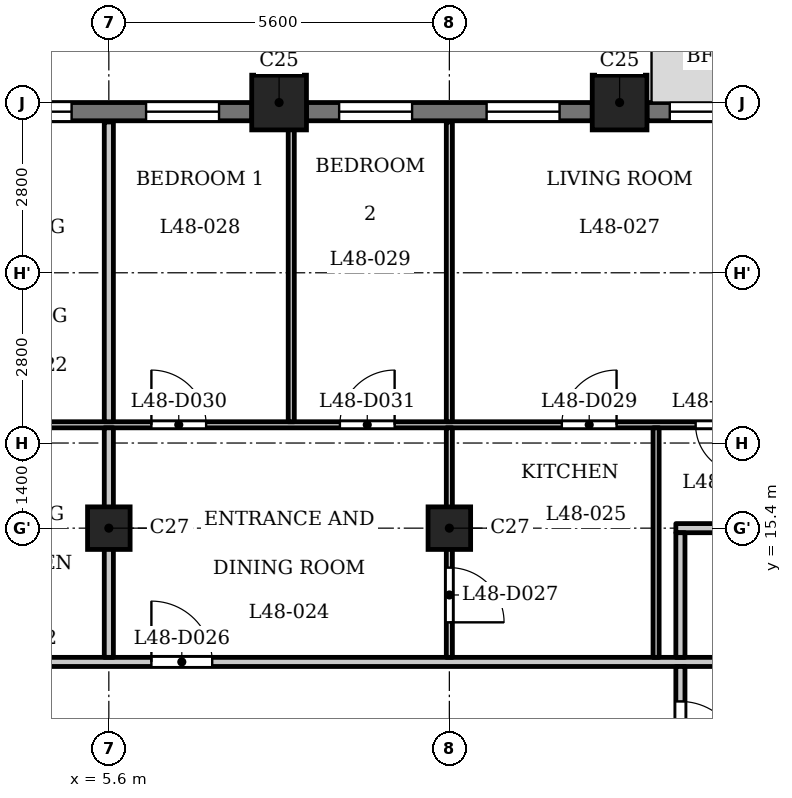
"""IFC4 building model, lengths in metres.
Left out: names, types, materials, properties, quantities, classifications, styles, units other than length and angle.
Written with IfcOpenShell. Run it as: python <this file> out.ifc"""

import sys

from ifc_helpers import new_model, si_unit, direction, frame, frame_2d, origin, origin_2d, place, context, subcontext, project, spatial, rectangle, extrude, element, fill, save


model = new_model("IFC4")
c1 = context("Model", 3, precision=1e-05, world=origin(), true_north=direction((0.0, 1.0)))
c2 = subcontext(c1, "Body", "Model", "MODEL_VIEW")
j1 = project(units=[si_unit("LENGTHUNIT", "METRE"), si_unit("PLANEANGLEUNIT", "RADIAN")], contexts=[c1])
p1 = place(None, origin())
s1 = spatial("IfcSite", under=j1, at=p1, CompositionType="ELEMENT")
p2 = place(p1, origin())
s2 = spatial("IfcBuilding", under=s1, at=p2, CompositionType="ELEMENT")
p3 = place(p2, frame((0.0, 0.0, 188.9)))
s3 = spatial("IfcBuildingStorey", under=s2, at=p3, CompositionType="ELEMENT", Elevation=188.9)
for number, where, z_axis, x_axis in (
    (1, (14.0, 22.4, 0.0), (0.0, 0.0, 1.0), (1.0, 0.0, 0.0)),
    (2, (8.4, 22.4, 0.0), (0.0, 0.0, 1.0), (1.0, 0.0, 0.0)),
):
    element("IfcColumn", number, at=place(p3, frame(where, z_axis=z_axis, x_axis=x_axis)), inside=s3, PredefinedType="COLUMN", context=c2, shape_type="SweptSolid", body=[
        extrude(rectangle(XDim=0.9, YDim=0.9, at=origin_2d()), origin(), (0.0, 0.0, 1.0), 3.5),
    ])
for number, where, z_axis, x_axis in (
    (3, (5.6, 15.4, 0.0), (0.0, 0.0, 1.0), (1.0, 0.0, 0.0)),
    (4, (11.2, 15.4, 0.0), (0.0, 0.0, 1.0), (1.0, 0.0, 0.0)),
):
    element("IfcColumn", number, at=place(p3, frame(where, z_axis=z_axis, x_axis=x_axis)), inside=s3, PredefinedType="COLUMN", context=c2, shape_type="SweptSolid", body=[
        extrude(rectangle(XDim=0.7, YDim=0.7, at=origin_2d()), origin(), (0.0, 0.0, 1.0), 3.5),
    ])
p4 = place(p3, frame((16.4, 22.25, 0.0), z_axis=(0.0, 0.0, 1.0), x_axis=(-1.0, 0.0, 0.0)))
e5 = element("IfcWall", 5, at=p4, inside=s3, PredefinedType="SOLIDWALL", context=c2, shape_type="SweptSolid", body=[
    extrude(rectangle(XDim=1.95, YDim=0.3, at=frame_2d((0.975, 0.0))), origin(), (0.0, 0.0, 1.0), 2.5),
])
p5 = place(p4, frame((0.375, 0.0, 0.6)))
e6 = element("IfcOpeningElement", 6, at=p5, cuts=e5, PredefinedType="OPENING", context=c2, shape_type="SweptSolid", body=[
    extrude(rectangle(XDim=1.2, YDim=1.55, at=frame_2d((0.6, 0.775))), frame((0.0, 0.16, 0.0), z_axis=(0.0, -1.0, 0.0), x_axis=(1.0, 0.0, 0.0)), (0.0, 0.0, 1.0), 0.32),
])
p6 = place(p3, frame((13.55, 22.25, 0.0), z_axis=(0.0, 0.0, 1.0), x_axis=(-1.0, 0.0, 0.0)))
e7 = element("IfcWall", 7, at=p6, inside=s3, PredefinedType="SOLIDWALL", context=c2, shape_type="SweptSolid", body=[
    extrude(rectangle(XDim=4.7, YDim=0.3, at=frame_2d((2.35, 0.0))), origin(), (0.0, 0.0, 1.0), 2.5),
])
p7 = place(p6, frame((0.538, 0.0, 0.6)))
e8 = element("IfcOpeningElement", 8, at=p7, cuts=e7, PredefinedType="OPENING", context=c2, shape_type="SweptSolid", body=[
    extrude(rectangle(XDim=1.2, YDim=1.55, at=frame_2d((0.6, 0.775))), frame((0.0, 0.16, 0.0), z_axis=(0.0, -1.0, 0.0), x_axis=(1.0, 0.0, 0.0)), (0.0, 0.0, 1.0), 0.32),
])
p8 = place(p6, frame((2.962, 0.0, 0.6)))
e9 = element("IfcOpeningElement", 9, at=p8, cuts=e7, PredefinedType="OPENING", context=c2, shape_type="SweptSolid", body=[
    extrude(rectangle(XDim=1.2, YDim=1.55, at=frame_2d((0.6, 0.775))), frame((0.0, 0.16, 0.0), z_axis=(0.0, -1.0, 0.0), x_axis=(1.0, 0.0, 0.0)), (0.0, 0.0, 1.0), 0.32),
])
p9 = place(p3, frame((7.95, 22.25, 0.0), z_axis=(0.0, 0.0, 1.0), x_axis=(-1.0, 0.0, 0.0)))
e10 = element("IfcWall", 10, at=p9, inside=s3, PredefinedType="SOLIDWALL", context=c2, shape_type="SweptSolid", body=[
    extrude(rectangle(XDim=4.7, YDim=0.3, at=frame_2d((2.35, 0.0))), origin(), (0.0, 0.0, 1.0), 2.5),
])
p10 = place(p9, frame((0.538, 0.0, 0.6)))
e11 = element("IfcOpeningElement", 11, at=p10, cuts=e10, PredefinedType="OPENING", context=c2, shape_type="SweptSolid", body=[
    extrude(rectangle(XDim=1.2, YDim=1.55, at=frame_2d((0.6, 0.775))), frame((0.0, 0.16, 0.0), z_axis=(0.0, -1.0, 0.0), x_axis=(1.0, 0.0, 0.0)), (0.0, 0.0, 1.0), 0.32),
])
p11 = place(p9, frame((2.962, 0.0, 0.6)))
e12 = element("IfcOpeningElement", 12, at=p11, cuts=e10, PredefinedType="OPENING", context=c2, shape_type="SweptSolid", body=[
    extrude(rectangle(XDim=1.2, YDim=1.55, at=frame_2d((0.6, 0.775))), frame((0.0, 0.16, 0.0), z_axis=(0.0, -1.0, 0.0), x_axis=(1.0, 0.0, 0.0)), (0.0, 0.0, 1.0), 0.32),
])
p12 = place(p3, frame((-17.4, 13.2, 0.0), z_axis=(0.0, 0.0, 1.0), x_axis=(1.0, 0.0, 0.0)))
e13 = element("IfcWall", 13, at=p12, inside=s3, PredefinedType="PARTITIONING", context=c2, shape_type="SweptSolid", body=[
    extrude(rectangle(XDim=34.8, YDim=0.15, at=frame_2d((17.4, 0.0))), origin(), (0.0, 0.0, 1.0), 3.2),
])
p13 = place(p12, frame((0.25, 0.0, 0.0)))
e14 = element("IfcOpeningElement", 14, at=p13, cuts=e13, PredefinedType="OPENING", context=c2, shape_type="SweptSolid", body=[
    extrude(rectangle(XDim=1.0, YDim=2.1, at=frame_2d((0.5, 1.05))), frame((0.0, 0.085, 0.0), z_axis=(0.0, -1.0, 0.0), x_axis=(1.0, 0.0, 0.0)), (0.0, 0.0, 1.0), 0.17),
])
p14 = place(p12, frame((33.65, 0.0, 0.0)))
e15 = element("IfcOpeningElement", 15, at=p14, cuts=e13, PredefinedType="OPENING", context=c2, shape_type="SweptSolid", body=[
    extrude(rectangle(XDim=1.0, YDim=2.1, at=frame_2d((0.5, 1.05))), frame((0.0, 0.085, 0.0), z_axis=(0.0, -1.0, 0.0), x_axis=(1.0, 0.0, 0.0)), (0.0, 0.0, 1.0), 0.17),
])
p15 = place(p12, frame((10.15, 0.0, 0.0)))
e16 = element("IfcOpeningElement", 16, at=p15, cuts=e13, PredefinedType="OPENING", context=c2, shape_type="SweptSolid", body=[
    extrude(rectangle(XDim=1.0, YDim=2.1, at=frame_2d((0.5, 1.05))), frame((0.0, 0.085, 0.0), z_axis=(0.0, -1.0, 0.0), x_axis=(1.0, 0.0, 0.0)), (0.0, 0.0, 1.0), 0.17),
])
p16 = place(p12, frame((13.55, 0.0, 0.0)))
e17 = element("IfcOpeningElement", 17, at=p16, cuts=e13, PredefinedType="OPENING", context=c2, shape_type="SweptSolid", body=[
    extrude(rectangle(XDim=1.0, YDim=2.1, at=frame_2d((0.5, 1.05))), frame((0.0, 0.085, 0.0), z_axis=(0.0, -1.0, 0.0), x_axis=(1.0, 0.0, 0.0)), (0.0, 0.0, 1.0), 0.17),
])
p17 = place(p12, frame((20.85, 0.0, 0.0)))
e18 = element("IfcOpeningElement", 18, at=p17, cuts=e13, PredefinedType="OPENING", context=c2, shape_type="SweptSolid", body=[
    extrude(rectangle(XDim=1.0, YDim=2.1, at=frame_2d((0.5, 1.05))), frame((0.0, 0.085, 0.0), z_axis=(0.0, -1.0, 0.0), x_axis=(1.0, 0.0, 0.0)), (0.0, 0.0, 1.0), 0.17),
])
p18 = place(p12, frame((23.7, 0.0, 0.0)))
e19 = element("IfcOpeningElement", 19, at=p18, cuts=e13, PredefinedType="OPENING", context=c2, shape_type="SweptSolid", body=[
    extrude(rectangle(XDim=1.0, YDim=2.1, at=frame_2d((0.5, 1.05))), frame((0.0, 0.085, 0.0), z_axis=(0.0, -1.0, 0.0), x_axis=(1.0, 0.0, 0.0)), (0.0, 0.0, 1.0), 0.17),
])
p19 = place(p3, frame((14.925, 15.4, 0.0), z_axis=(0.0, 0.0, 1.0), x_axis=(1.0, 0.0, 0.0)))
e20 = element("IfcWall", 20, at=p19, inside=s3, PredefinedType="PARTITIONING", context=c2, shape_type="SweptSolid", body=[
    extrude(rectangle(XDim=9.759, YDim=0.15, at=frame_2d((4.879, 0.0))), origin(), (0.0, 0.0, 1.0), 3.2),
])
p20 = place(p19, frame((5.116, 0.0, 0.0)))
e21 = element("IfcOpeningElement", 21, at=p20, cuts=e20, PredefinedType="OPENING", context=c2, shape_type="SweptSolid", body=[
    extrude(rectangle(XDim=1.0, YDim=2.1, at=frame_2d((0.5, 1.05))), frame((0.0, 0.085, 0.0), z_axis=(0.0, -1.0, 0.0), x_axis=(1.0, 0.0, 0.0)), (0.0, 0.0, 1.0), 0.17),
])
p21 = place(p3, frame((-16.725, 17.1, 0.0), z_axis=(0.0, 0.0, 1.0), x_axis=(1.0, 0.0, 0.0)))
e22 = element("IfcWall", 22, at=p21, inside=s3, PredefinedType="PARTITIONING", context=c2, shape_type="SweptSolid", body=[
    extrude(rectangle(XDim=33.45, YDim=0.1, at=frame_2d((16.725, 0.0))), origin(), (0.0, 0.0, 1.0), 3.2),
])
p22 = place(p21, frame((4.075, 0.0, 0.0)))
e23 = element("IfcOpeningElement", 23, at=p22, cuts=e22, PredefinedType="OPENING", context=c2, shape_type="SweptSolid", body=[
    extrude(rectangle(XDim=0.8, YDim=2.1, at=frame_2d((0.4, 1.05))), frame((0.0, 0.06, 0.0), z_axis=(0.0, -1.0, 0.0), x_axis=(1.0, 0.0, 0.0)), (0.0, 0.0, 1.0), 0.12),
])
p23 = place(p21, frame((9.575, 0.0, 0.0)))
e24 = element("IfcOpeningElement", 24, at=p23, cuts=e22, PredefinedType="OPENING", context=c2, shape_type="SweptSolid", body=[
    extrude(rectangle(XDim=0.9, YDim=2.1, at=frame_2d((0.45, 1.05))), frame((0.0, 0.06, 0.0), z_axis=(0.0, -1.0, 0.0), x_axis=(1.0, 0.0, 0.0)), (0.0, 0.0, 1.0), 0.12),
])
p24 = place(p21, frame((15.175, 0.0, 0.0)))
e25 = element("IfcOpeningElement", 25, at=p24, cuts=e22, PredefinedType="OPENING", context=c2, shape_type="SweptSolid", body=[
    extrude(rectangle(XDim=0.8, YDim=2.1, at=frame_2d((0.4, 1.05))), frame((0.0, 0.06, 0.0), z_axis=(0.0, -1.0, 0.0), x_axis=(1.0, 0.0, 0.0)), (0.0, 0.0, 1.0), 0.12),
])
p25 = place(p21, frame((12.975, 0.0, 0.0)))
e26 = element("IfcOpeningElement", 26, at=p25, cuts=e22, PredefinedType="OPENING", context=c2, shape_type="SweptSolid", body=[
    extrude(rectangle(XDim=0.9, YDim=2.1, at=frame_2d((0.45, 1.05))), frame((0.0, 0.06, 0.0), z_axis=(0.0, -1.0, 0.0), x_axis=(1.0, 0.0, 0.0)), (0.0, 0.0, 1.0), 0.12),
])
p26 = place(p21, frame((17.625, 0.0, 0.0)))
e27 = element("IfcOpeningElement", 27, at=p26, cuts=e22, PredefinedType="OPENING", context=c2, shape_type="SweptSolid", body=[
    extrude(rectangle(XDim=0.8, YDim=2.1, at=frame_2d((0.4, 1.05))), frame((0.0, 0.06, 0.0), z_axis=(0.0, -1.0, 0.0), x_axis=(1.0, 0.0, 0.0)), (0.0, 0.0, 1.0), 0.12),
])
p27 = place(p21, frame((20.025, 0.0, 0.0)))
e28 = element("IfcOpeningElement", 28, at=p27, cuts=e22, PredefinedType="OPENING", context=c2, shape_type="SweptSolid", body=[
    extrude(rectangle(XDim=0.9, YDim=2.1, at=frame_2d((0.45, 1.05))), frame((0.0, 0.06, 0.0), z_axis=(0.0, -1.0, 0.0), x_axis=(1.0, 0.0, 0.0)), (0.0, 0.0, 1.0), 0.12),
])
p28 = place(p21, frame((31.975, 0.0, 0.0)))
e29 = element("IfcOpeningElement", 29, at=p28, cuts=e22, PredefinedType="OPENING", context=c2, shape_type="SweptSolid", body=[
    extrude(rectangle(XDim=0.8, YDim=2.1, at=frame_2d((0.4, 1.05))), frame((0.0, 0.06, 0.0), z_axis=(0.0, -1.0, 0.0), x_axis=(1.0, 0.0, 0.0)), (0.0, 0.0, 1.0), 0.12),
])
p29 = place(p21, frame((29.775, 0.0, 0.0)))
e30 = element("IfcOpeningElement", 30, at=p29, cuts=e22, PredefinedType="OPENING", context=c2, shape_type="SweptSolid", body=[
    extrude(rectangle(XDim=0.9, YDim=2.1, at=frame_2d((0.45, 1.05))), frame((0.0, 0.06, 0.0), z_axis=(0.0, -1.0, 0.0), x_axis=(1.0, 0.0, 0.0)), (0.0, 0.0, 1.0), 0.12),
])
p30 = place(p21, frame((23.025, 0.0, 0.0)))
e31 = element("IfcOpeningElement", 31, at=p30, cuts=e22, PredefinedType="OPENING", context=c2, shape_type="SweptSolid", body=[
    extrude(rectangle(XDim=0.9, YDim=2.1, at=frame_2d((0.45, 1.05))), frame((0.0, 0.06, 0.0), z_axis=(0.0, -1.0, 0.0), x_axis=(1.0, 0.0, 0.0)), (0.0, 0.0, 1.0), 0.12),
])
p31 = place(p21, frame((26.125, 0.0, 0.0)))
e32 = element("IfcOpeningElement", 32, at=p31, cuts=e22, PredefinedType="OPENING", context=c2, shape_type="SweptSolid", body=[
    extrude(rectangle(XDim=0.9, YDim=2.1, at=frame_2d((0.45, 1.05))), frame((0.0, 0.06, 0.0), z_axis=(0.0, -1.0, 0.0), x_axis=(1.0, 0.0, 0.0)), (0.0, 0.0, 1.0), 0.12),
])
p32 = place(p3, frame((5.6, 13.275, 0.0), z_axis=(0.0, 0.0, 1.0), x_axis=(0.0, 1.0, 0.0)))
e33 = element("IfcWall", 33, at=p32, inside=s3, PredefinedType="PARTITIONING", context=c2, shape_type="SweptSolid", body=[
    extrude(rectangle(XDim=3.775, YDim=0.15, at=frame_2d((1.888, 0.0))), origin(), (0.0, 0.0, 1.0), 3.2),
])
p33 = place(p3, frame((5.6, 17.15, 0.0), z_axis=(0.0, 0.0, 1.0), x_axis=(0.0, 1.0, 0.0)))
e34 = element("IfcWall", 34, at=p33, inside=s3, PredefinedType="PARTITIONING", context=c2, shape_type="SweptSolid", body=[
    extrude(rectangle(XDim=4.93, YDim=0.15, at=frame_2d((2.465, 0.0))), origin(), (0.0, 0.0, 1.0), 3.2),
])
p34 = place(p3, frame((8.6, 17.15, 0.0), z_axis=(0.0, 0.0, 1.0), x_axis=(0.0, 1.0, 0.0)))
e35 = element("IfcWall", 35, at=p34, inside=s3, PredefinedType="PARTITIONING", context=c2, shape_type="SweptSolid", body=[
    extrude(rectangle(XDim=5.68, YDim=0.1, at=frame_2d((2.84, 0.0))), origin(), (0.0, 0.0, 1.0), 3.2),
])
p35 = place(p3, frame((11.2, 13.275, 0.0), z_axis=(0.0, 0.0, 1.0), x_axis=(0.0, 1.0, 0.0)))
e36 = element("IfcWall", 36, at=p35, inside=s3, PredefinedType="PARTITIONING", context=c2, shape_type="SweptSolid", body=[
    extrude(rectangle(XDim=3.775, YDim=0.1, at=frame_2d((1.888, 0.0))), origin(), (0.0, 0.0, 1.0), 3.2),
])
p36 = place(p35, frame((0.576, 0.0, 0.0)))
e37 = element("IfcOpeningElement", 37, at=p36, cuts=e36, PredefinedType="OPENING", context=c2, shape_type="SweptSolid", body=[
    extrude(rectangle(XDim=0.9, YDim=2.1, at=frame_2d((0.45, 1.05))), frame((0.0, 0.06, 0.0), z_axis=(0.0, -1.0, 0.0), x_axis=(1.0, 0.0, 0.0)), (0.0, 0.0, 1.0), 0.12),
])
p37 = place(p3, frame((11.2, 17.15, 0.0), z_axis=(0.0, 0.0, 1.0), x_axis=(0.0, 1.0, 0.0)))
e38 = element("IfcWall", 38, at=p37, inside=s3, PredefinedType="PARTITIONING", context=c2, shape_type="SweptSolid", body=[
    extrude(rectangle(XDim=4.93, YDim=0.1, at=frame_2d((2.465, 0.0))), origin(), (0.0, 0.0, 1.0), 3.2),
])
p38 = place(p3, frame((14.6, 13.275, 0.0), z_axis=(0.0, 0.0, 1.0), x_axis=(0.0, 1.0, 0.0)))
e39 = element("IfcWall", 39, at=p38, inside=s3, PredefinedType="PARTITIONING", context=c2, shape_type="SweptSolid", body=[
    extrude(rectangle(XDim=3.775, YDim=0.1, at=frame_2d((1.888, 0.0))), origin(), (0.0, 0.0, 1.0), 3.2),
])
p39 = place(p3, frame((15.0, 6.769, 0.0), z_axis=(0.0, 0.0, 1.0), x_axis=(0.0, 1.0, 0.0)))
e40 = element("IfcWall", 40, at=p39, inside=s3, PredefinedType="PARTITIONING", context=c2, shape_type="SweptSolid", body=[
    extrude(rectangle(XDim=6.356, YDim=0.15, at=frame_2d((3.178, 0.0))), origin(), (0.0, 0.0, 1.0), 3.2),
])
p40 = place(p39, frame((4.781, 0.0, 0.0)))
e41 = element("IfcOpeningElement", 41, at=p40, cuts=e40, PredefinedType="OPENING", context=c2, shape_type="SweptSolid", body=[
    extrude(rectangle(XDim=1.0, YDim=2.1, at=frame_2d((0.5, 1.05))), frame((0.0, 0.085, 0.0), z_axis=(0.0, -1.0, 0.0), x_axis=(1.0, 0.0, 0.0)), (0.0, 0.0, 1.0), 0.17),
])
p41 = place(p3, frame((15.0, 13.275, 0.0), z_axis=(0.0, 0.0, 1.0), x_axis=(0.0, 1.0, 0.0)))
e42 = element("IfcWall", 42, at=p41, inside=s3, PredefinedType="PARTITIONING", context=c2, shape_type="SweptSolid", body=[
    extrude(rectangle(XDim=2.05, YDim=0.15, at=frame_2d((1.025, 0.0))), origin(), (0.0, 0.0, 1.0), 3.2),
])
p42 = place(p40, origin())
e43 = element("IfcDoor", 43, at=p42, inside=s3, OperationType="SINGLE_SWING_LEFT", PredefinedType="DOOR", context=c2, shape_type="SweptSolid", body=[
    extrude(rectangle(XDim=1.0, YDim=2.1, at=frame_2d((0.5, 1.05))), frame((0.0, 0.025, 0.0), z_axis=(0.0, -1.0, 0.0), x_axis=(1.0, 0.0, 0.0)), (0.0, 0.0, 1.0), 0.05),
])
fill(e41, e43)
p43 = place(p18, origin())
e44 = element("IfcDoor", 44, at=p43, inside=s3, OperationType="SINGLE_SWING_RIGHT", PredefinedType="DOOR", context=c2, shape_type="SweptSolid", body=[
    extrude(rectangle(XDim=1.0, YDim=2.1, at=frame_2d((0.5, 1.05))), frame((0.0, 0.025, 0.0), z_axis=(0.0, -1.0, 0.0), x_axis=(1.0, 0.0, 0.0)), (0.0, 0.0, 1.0), 0.05),
])
fill(e19, e44)
p44 = place(p36, origin())
e45 = element("IfcDoor", 45, at=p44, inside=s3, OperationType="SINGLE_SWING_LEFT", PredefinedType="DOOR", context=c2, shape_type="SweptSolid", body=[
    extrude(rectangle(XDim=0.9, YDim=2.1, at=frame_2d((0.45, 1.05))), frame((0.0, 0.025, 0.0), z_axis=(0.0, -1.0, 0.0), x_axis=(1.0, 0.0, 0.0)), (0.0, 0.0, 1.0), 0.05),
])
fill(e37, e45)
p45 = place(p28, origin())
e46 = element("IfcDoor", 46, at=p45, inside=s3, OperationType="SINGLE_SWING_RIGHT", PredefinedType="DOOR", context=c2, shape_type="SweptSolid", body=[
    extrude(rectangle(XDim=0.8, YDim=2.1, at=frame_2d((0.4, 1.05))), frame((0.0, 0.025, 0.0), z_axis=(0.0, -1.0, 0.0), x_axis=(1.0, 0.0, 0.0)), (0.0, 0.0, 1.0), 0.05),
])
fill(e29, e46)
p46 = place(p29, origin())
e47 = element("IfcDoor", 47, at=p46, inside=s3, OperationType="SINGLE_SWING_LEFT", PredefinedType="DOOR", context=c2, shape_type="SweptSolid", body=[
    extrude(rectangle(XDim=0.9, YDim=2.1, at=frame_2d((0.45, 1.05))), frame((0.0, 0.025, 0.0), z_axis=(0.0, -1.0, 0.0), x_axis=(1.0, 0.0, 0.0)), (0.0, 0.0, 1.0), 0.05),
])
fill(e30, e47)
p47 = place(p30, origin())
e48 = element("IfcDoor", 48, at=p47, inside=s3, OperationType="SINGLE_SWING_RIGHT", PredefinedType="DOOR", context=c2, shape_type="SweptSolid", body=[
    extrude(rectangle(XDim=0.9, YDim=2.1, at=frame_2d((0.45, 1.05))), frame((0.0, 0.025, 0.0), z_axis=(0.0, -1.0, 0.0), x_axis=(1.0, 0.0, 0.0)), (0.0, 0.0, 1.0), 0.05),
])
fill(e31, e48)
p48 = place(p31, origin())
e49 = element("IfcDoor", 49, at=p48, inside=s3, OperationType="SINGLE_SWING_LEFT", PredefinedType="DOOR", context=c2, shape_type="SweptSolid", body=[
    extrude(rectangle(XDim=0.9, YDim=2.1, at=frame_2d((0.45, 1.05))), frame((0.0, 0.025, 0.0), z_axis=(0.0, -1.0, 0.0), x_axis=(1.0, 0.0, 0.0)), (0.0, 0.0, 1.0), 0.05),
])
fill(e32, e49)
p49 = place(p5, origin())
e50 = element("IfcWindow", 50, at=p49, inside=s3, PartitioningType="SINGLE_PANEL", PredefinedType="WINDOW", context=c2, shape_type="SweptSolid", body=[
    extrude(rectangle(XDim=1.2, YDim=1.55, at=frame_2d((0.6, 0.775))), frame((0.0, 0.03, 0.0), z_axis=(0.0, -1.0, 0.0), x_axis=(1.0, 0.0, 0.0)), (0.0, 0.0, 1.0), 0.06),
])
fill(e6, e50)
p50 = place(p7, origin())
e51 = element("IfcWindow", 51, at=p50, inside=s3, PartitioningType="SINGLE_PANEL", PredefinedType="WINDOW", context=c2, shape_type="SweptSolid", body=[
    extrude(rectangle(XDim=1.2, YDim=1.55, at=frame_2d((0.6, 0.775))), frame((0.0, 0.03, 0.0), z_axis=(0.0, -1.0, 0.0), x_axis=(1.0, 0.0, 0.0)), (0.0, 0.0, 1.0), 0.06),
])
fill(e8, e51)
p51 = place(p8, origin())
e52 = element("IfcWindow", 52, at=p51, inside=s3, PartitioningType="SINGLE_PANEL", PredefinedType="WINDOW", context=c2, shape_type="SweptSolid", body=[
    extrude(rectangle(XDim=1.2, YDim=1.55, at=frame_2d((0.6, 0.775))), frame((0.0, 0.03, 0.0), z_axis=(0.0, -1.0, 0.0), x_axis=(1.0, 0.0, 0.0)), (0.0, 0.0, 1.0), 0.06),
])
fill(e9, e52)
p52 = place(p10, origin())
e53 = element("IfcWindow", 53, at=p52, inside=s3, PartitioningType="SINGLE_PANEL", PredefinedType="WINDOW", context=c2, shape_type="SweptSolid", body=[
    extrude(rectangle(XDim=1.2, YDim=1.55, at=frame_2d((0.6, 0.775))), frame((0.0, 0.03, 0.0), z_axis=(0.0, -1.0, 0.0), x_axis=(1.0, 0.0, 0.0)), (0.0, 0.0, 1.0), 0.06),
])
fill(e11, e53)
p53 = place(p11, origin())
e54 = element("IfcWindow", 54, at=p53, inside=s3, PartitioningType="SINGLE_PANEL", PredefinedType="WINDOW", context=c2, shape_type="SweptSolid", body=[
    extrude(rectangle(XDim=1.2, YDim=1.55, at=frame_2d((0.6, 0.775))), frame((0.0, 0.03, 0.0), z_axis=(0.0, -1.0, 0.0), x_axis=(1.0, 0.0, 0.0)), (0.0, 0.0, 1.0), 0.06),
])
fill(e12, e54)
save(model, sys.argv[1])
